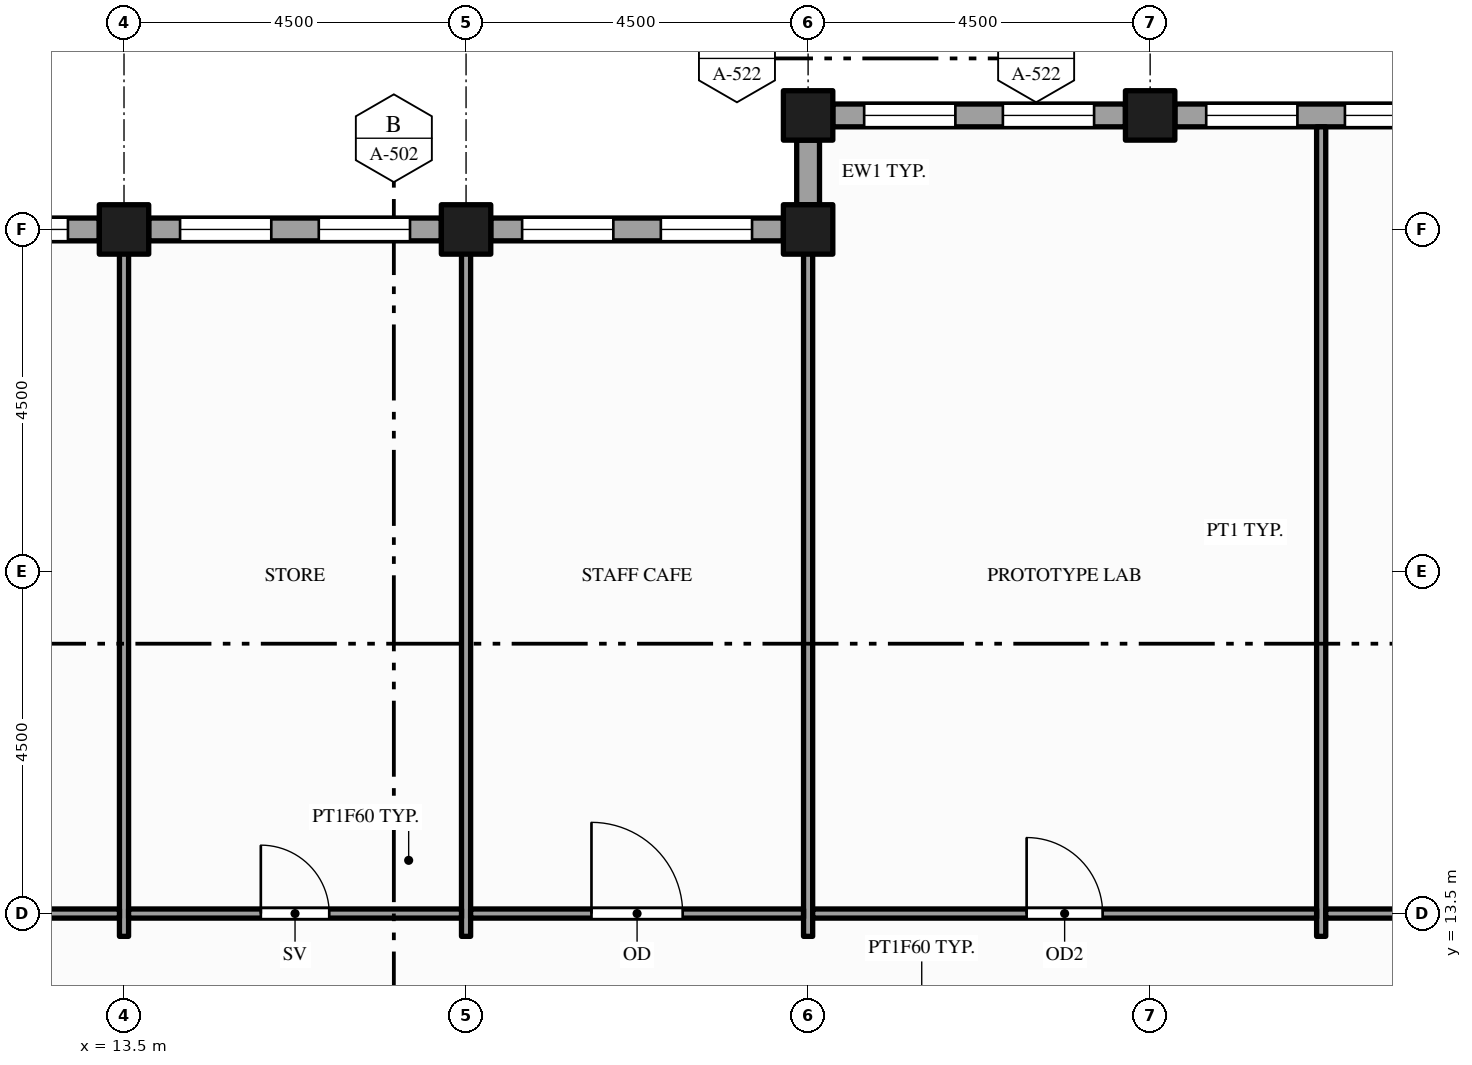
"""IFC4 building model, lengths in metres.
Left out: names, types, materials, properties, quantities, classifications, styles, units other than length and angle.
Written with IfcOpenShell. Run it as: python <this file> out.ifc"""

import sys

from ifc_helpers import new_model, si_unit, direction, frame, frame_2d, origin, origin_2d, place, context, subcontext, project, spatial, rectangle, hollow_rectangle, extrude, element, fill, save


model = new_model("IFC4")
c1 = context("Model", 3, precision=1e-05, world=origin(), true_north=direction((0.0, 1.0)))
c2 = subcontext(c1, "Body", "Model", "MODEL_VIEW")
j1 = project(units=[si_unit("LENGTHUNIT", "METRE"), si_unit("PLANEANGLEUNIT", "RADIAN")], contexts=[c1])
p1 = place(None, origin())
s1 = spatial("IfcSite", under=j1, at=p1, CompositionType="ELEMENT")
p2 = place(p1, origin())
s2 = spatial("IfcBuilding", under=s1, at=p2, CompositionType="ELEMENT")
p3 = place(p2, frame((0.0, 0.0, 261.0)))
s3 = spatial("IfcBuildingStorey", under=s2, at=p3, CompositionType="ELEMENT", Elevation=261.0)
for number, where, z_axis, x_axis in (
    (1, (13.5, 22.5, -0.15), (0.0, 0.0, 1.0), (1.0, 0.0, 0.0)),
    (2, (18.0, 22.5, -0.15), (0.0, 0.0, 1.0), (1.0, 0.0, 0.0)),
    (3, (22.5, 22.5, -0.15), (0.0, 0.0, 1.0), (1.0, 0.0, 0.0)),
    (4, (22.5, 24.0, -0.15), (0.0, 0.0, 1.0), (1.0, 0.0, 0.0)),
    (5, (27.0, 24.0, -0.15), (0.0, 0.0, 1.0), (1.0, 0.0, 0.0)),
):
    element("IfcColumn", number, at=place(p3, frame(where, z_axis=z_axis, x_axis=x_axis)), inside=s3, PredefinedType="COLUMN", context=c2, shape_type="SweptSolid", body=[
        extrude(hollow_rectangle(XDim=0.65, YDim=0.65, WallThickness=0.032, at=origin_2d()), origin(), (0.0, 0.0, 1.0), 4.0),
    ])
p4 = place(p3, frame((31.175, 24.0, 0.0), z_axis=(0.0, 0.0, 1.0), x_axis=(-1.0, 0.0, 0.0)))
e6 = element("IfcWall", 6, at=p4, inside=s3, PredefinedType="STANDARD", context=c2, shape_type="SweptSolid", body=[
    extrude(rectangle(XDim=3.85, YDim=0.3, at=frame_2d((1.925, 0.0))), origin(), (0.0, 0.0, 1.0), 2.87),
])
p5 = place(p4, frame((0.413, 0.0, 0.9)))
e7 = element("IfcOpeningElement", 7, at=p5, cuts=e6, PredefinedType="OPENING", context=c2, shape_type="SweptSolid", body=[
    extrude(rectangle(XDim=1.2, YDim=1.75, at=frame_2d((0.6, 0.875))), frame((0.0, 0.16, 0.0), z_axis=(0.0, -1.0, 0.0), x_axis=(1.0, 0.0, 0.0)), (0.0, 0.0, 1.0), 0.32),
])
p6 = place(p4, frame((2.238, 0.0, 0.9)))
e8 = element("IfcOpeningElement", 8, at=p6, cuts=e6, PredefinedType="OPENING", context=c2, shape_type="SweptSolid", body=[
    extrude(rectangle(XDim=1.2, YDim=1.75, at=frame_2d((0.6, 0.875))), frame((0.0, 0.16, 0.0), z_axis=(0.0, -1.0, 0.0), x_axis=(1.0, 0.0, 0.0)), (0.0, 0.0, 1.0), 0.32),
])
p7 = place(p3, frame((26.675, 24.0, 0.0), z_axis=(0.0, 0.0, 1.0), x_axis=(-1.0, 0.0, 0.0)))
e9 = element("IfcWall", 9, at=p7, inside=s3, PredefinedType="STANDARD", context=c2, shape_type="SweptSolid", body=[
    extrude(rectangle(XDim=3.85, YDim=0.3, at=frame_2d((1.925, 0.0))), origin(), (0.0, 0.0, 1.0), 2.87),
])
p8 = place(p7, frame((0.413, 0.0, 0.9)))
e10 = element("IfcOpeningElement", 10, at=p8, cuts=e9, PredefinedType="OPENING", context=c2, shape_type="SweptSolid", body=[
    extrude(rectangle(XDim=1.2, YDim=1.75, at=frame_2d((0.6, 0.875))), frame((0.0, 0.16, 0.0), z_axis=(0.0, -1.0, 0.0), x_axis=(1.0, 0.0, 0.0)), (0.0, 0.0, 1.0), 0.32),
])
p9 = place(p7, frame((2.238, 0.0, 0.9)))
e11 = element("IfcOpeningElement", 11, at=p9, cuts=e9, PredefinedType="OPENING", context=c2, shape_type="SweptSolid", body=[
    extrude(rectangle(XDim=1.2, YDim=1.75, at=frame_2d((0.6, 0.875))), frame((0.0, 0.16, 0.0), z_axis=(0.0, -1.0, 0.0), x_axis=(1.0, 0.0, 0.0)), (0.0, 0.0, 1.0), 0.32),
])
p10 = place(p3, frame((22.5, 23.675, 0.0), z_axis=(0.0, 0.0, 1.0), x_axis=(0.0, -1.0, 0.0)))
e12 = element("IfcWall", 12, at=p10, inside=s3, PredefinedType="STANDARD", context=c2, shape_type="SweptSolid", body=[
    extrude(rectangle(XDim=0.85, YDim=0.3, at=frame_2d((0.425, 0.0))), origin(), (0.0, 0.0, 1.0), 3.162),
])
p11 = place(p3, frame((22.175, 22.5, 0.0), z_axis=(0.0, 0.0, 1.0), x_axis=(-1.0, 0.0, 0.0)))
e13 = element("IfcWall", 13, at=p11, inside=s3, PredefinedType="STANDARD", context=c2, shape_type="SweptSolid", body=[
    extrude(rectangle(XDim=3.85, YDim=0.3, at=frame_2d((1.925, 0.0))), origin(), (0.0, 0.0, 1.0), 2.87),
])
p12 = place(p11, frame((0.413, 0.0, 0.9)))
e14 = element("IfcOpeningElement", 14, at=p12, cuts=e13, PredefinedType="OPENING", context=c2, shape_type="SweptSolid", body=[
    extrude(rectangle(XDim=1.2, YDim=1.75, at=frame_2d((0.6, 0.875))), frame((0.0, 0.16, 0.0), z_axis=(0.0, -1.0, 0.0), x_axis=(1.0, 0.0, 0.0)), (0.0, 0.0, 1.0), 0.32),
])
p13 = place(p11, frame((2.238, 0.0, 0.9)))
e15 = element("IfcOpeningElement", 15, at=p13, cuts=e13, PredefinedType="OPENING", context=c2, shape_type="SweptSolid", body=[
    extrude(rectangle(XDim=1.2, YDim=1.75, at=frame_2d((0.6, 0.875))), frame((0.0, 0.16, 0.0), z_axis=(0.0, -1.0, 0.0), x_axis=(1.0, 0.0, 0.0)), (0.0, 0.0, 1.0), 0.32),
])
p14 = place(p3, frame((17.675, 22.5, 0.0), z_axis=(0.0, 0.0, 1.0), x_axis=(-1.0, 0.0, 0.0)))
e16 = element("IfcWall", 16, at=p14, inside=s3, PredefinedType="STANDARD", context=c2, shape_type="SweptSolid", body=[
    extrude(rectangle(XDim=3.85, YDim=0.3, at=frame_2d((1.925, 0.0))), origin(), (0.0, 0.0, 1.0), 2.87),
])
p15 = place(p14, frame((0.413, 0.0, 0.9)))
e17 = element("IfcOpeningElement", 17, at=p15, cuts=e16, PredefinedType="OPENING", context=c2, shape_type="SweptSolid", body=[
    extrude(rectangle(XDim=1.2, YDim=1.75, at=frame_2d((0.6, 0.875))), frame((0.0, 0.16, 0.0), z_axis=(0.0, -1.0, 0.0), x_axis=(1.0, 0.0, 0.0)), (0.0, 0.0, 1.0), 0.32),
])
p16 = place(p14, frame((2.238, 0.0, 0.9)))
e18 = element("IfcOpeningElement", 18, at=p16, cuts=e16, PredefinedType="OPENING", context=c2, shape_type="SweptSolid", body=[
    extrude(rectangle(XDim=1.2, YDim=1.75, at=frame_2d((0.6, 0.875))), frame((0.0, 0.16, 0.0), z_axis=(0.0, -1.0, 0.0), x_axis=(1.0, 0.0, 0.0)), (0.0, 0.0, 1.0), 0.32),
])
p17 = place(p3, frame((13.175, 22.5, 0.0), z_axis=(0.0, 0.0, 1.0), x_axis=(-1.0, 0.0, 0.0)))
e19 = element("IfcWall", 19, at=p17, inside=s3, PredefinedType="STANDARD", context=c2, shape_type="SweptSolid", body=[
    extrude(rectangle(XDim=3.85, YDim=0.3, at=frame_2d((1.925, 0.0))), origin(), (0.0, 0.0, 1.0), 2.87),
])
p18 = place(p17, frame((0.413, 0.0, 0.9)))
e20 = element("IfcOpeningElement", 20, at=p18, cuts=e19, PredefinedType="OPENING", context=c2, shape_type="SweptSolid", body=[
    extrude(rectangle(XDim=1.2, YDim=1.75, at=frame_2d((0.6, 0.875))), frame((0.0, 0.16, 0.0), z_axis=(0.0, -1.0, 0.0), x_axis=(1.0, 0.0, 0.0)), (0.0, 0.0, 1.0), 0.32),
])
p19 = place(p17, frame((2.238, 0.0, 0.9)))
e21 = element("IfcOpeningElement", 21, at=p19, cuts=e19, PredefinedType="OPENING", context=c2, shape_type="SweptSolid", body=[
    extrude(rectangle(XDim=1.2, YDim=1.75, at=frame_2d((0.6, 0.875))), frame((0.0, 0.16, 0.0), z_axis=(0.0, -1.0, 0.0), x_axis=(1.0, 0.0, 0.0)), (0.0, 0.0, 1.0), 0.32),
])
for number, where, z_axis, x_axis in (
    (22, (13.5, 13.2, 0.0), (0.0, 0.0, 1.0), (0.0, 1.0, 0.0)),
    (23, (18.0, 13.2, 0.0), (0.0, 0.0, 1.0), (0.0, 1.0, 0.0)),
    (24, (22.5, 13.2, 0.0), (0.0, 0.0, 1.0), (0.0, 1.0, 0.0)),
):
    element("IfcWall", number, at=place(p3, frame(where, z_axis=z_axis, x_axis=x_axis)), inside=s3, PredefinedType="PARTITIONING", context=c2, shape_type="SweptSolid", body=[
        extrude(rectangle(XDim=9.15, YDim=0.12, at=frame_2d((4.575, 0.0))), origin(), (0.0, 0.0, 1.0), 2.87),
    ])
p20 = place(p3, frame((29.25, 13.2, 0.0), z_axis=(0.0, 0.0, 1.0), x_axis=(0.0, 1.0, 0.0)))
e25 = element("IfcWall", 25, at=p20, inside=s3, PredefinedType="PARTITIONING", context=c2, shape_type="SweptSolid", body=[
    extrude(rectangle(XDim=10.65, YDim=0.12, at=frame_2d((5.325, 0.0))), origin(), (0.0, 0.0, 1.0), 2.87),
])
p21 = place(p3, frame((0.15, 13.5, 0.0), z_axis=(0.0, 0.0, 1.0), x_axis=(1.0, 0.0, 0.0)))
e26 = element("IfcWall", 26, at=p21, inside=s3, PredefinedType="PARTITIONING", context=c2, shape_type="SweptSolid", body=[
    extrude(rectangle(XDim=13.29, YDim=0.12, at=frame_2d((6.645, 0.0))), origin(), (0.0, 0.0, 1.0), 2.87),
])
p22 = place(p21, frame((5.755, 0.0, 0.0)))
e27 = element("IfcOpeningElement", 27, at=p22, cuts=e26, PredefinedType="OPENING", context=c2, shape_type="SweptSolid", body=[
    extrude(rectangle(XDim=1.8, YDim=2.1, at=frame_2d((0.9, 1.05))), frame((0.0, 0.07, 0.0), z_axis=(0.0, -1.0, 0.0), x_axis=(1.0, 0.0, 0.0)), (0.0, 0.0, 1.0), 0.14),
])
p23 = place(p3, frame((13.56, 13.5, 0.0), z_axis=(0.0, 0.0, 1.0), x_axis=(1.0, 0.0, 0.0)))
e28 = element("IfcWall", 28, at=p23, inside=s3, PredefinedType="PARTITIONING", context=c2, shape_type="SweptSolid", body=[
    extrude(rectangle(XDim=4.38, YDim=0.12, at=frame_2d((2.19, 0.0))), origin(), (0.0, 0.0, 1.0), 2.87),
])
p24 = place(p23, frame((1.74, 0.0, 0.0)))
e29 = element("IfcOpeningElement", 29, at=p24, cuts=e28, PredefinedType="OPENING", context=c2, shape_type="SweptSolid", body=[
    extrude(rectangle(XDim=0.9, YDim=2.1, at=frame_2d((0.45, 1.05))), frame((0.0, 0.07, 0.0), z_axis=(0.0, -1.0, 0.0), x_axis=(1.0, 0.0, 0.0)), (0.0, 0.0, 1.0), 0.14),
])
p25 = place(p3, frame((18.06, 13.5, 0.0), z_axis=(0.0, 0.0, 1.0), x_axis=(1.0, 0.0, 0.0)))
e30 = element("IfcWall", 30, at=p25, inside=s3, PredefinedType="PARTITIONING", context=c2, shape_type="SweptSolid", body=[
    extrude(rectangle(XDim=4.38, YDim=0.12, at=frame_2d((2.19, 0.0))), origin(), (0.0, 0.0, 1.0), 2.87),
])
p26 = place(p25, frame((1.59, 0.0, 0.0)))
e31 = element("IfcOpeningElement", 31, at=p26, cuts=e30, PredefinedType="OPENING", context=c2, shape_type="SweptSolid", body=[
    extrude(rectangle(XDim=1.2, YDim=2.1, at=frame_2d((0.6, 1.05))), frame((0.0, 0.07, 0.0), z_axis=(0.0, -1.0, 0.0), x_axis=(1.0, 0.0, 0.0)), (0.0, 0.0, 1.0), 0.14),
])
p27 = place(p3, frame((22.56, 13.5, 0.0), z_axis=(0.0, 0.0, 1.0), x_axis=(1.0, 0.0, 0.0)))
e32 = element("IfcWall", 32, at=p27, inside=s3, PredefinedType="PARTITIONING", context=c2, shape_type="SweptSolid", body=[
    extrude(rectangle(XDim=6.63, YDim=0.12, at=frame_2d((3.315, 0.0))), origin(), (0.0, 0.0, 1.0), 2.87),
])
p28 = place(p27, frame((2.815, 0.0, 0.0)))
e33 = element("IfcOpeningElement", 33, at=p28, cuts=e32, PredefinedType="OPENING", context=c2, shape_type="SweptSolid", body=[
    extrude(rectangle(XDim=1.0, YDim=2.1, at=frame_2d((0.5, 1.05))), frame((0.0, 0.07, 0.0), z_axis=(0.0, -1.0, 0.0), x_axis=(1.0, 0.0, 0.0)), (0.0, 0.0, 1.0), 0.14),
])
p29 = place(p3, frame((29.31, 13.5, 0.0), z_axis=(0.0, 0.0, 1.0), x_axis=(1.0, 0.0, 0.0)))
e34 = element("IfcWall", 34, at=p29, inside=s3, PredefinedType="PARTITIONING", context=c2, shape_type="SweptSolid", body=[
    extrude(rectangle(XDim=13.38, YDim=0.12, at=frame_2d((6.69, 0.0))), origin(), (0.0, 0.0, 1.0), 2.87),
])
p30 = place(p29, frame((6.19, 0.0, 0.0)))
e35 = element("IfcOpeningElement", 35, at=p30, cuts=e34, PredefinedType="OPENING", context=c2, shape_type="SweptSolid", body=[
    extrude(rectangle(XDim=1.0, YDim=2.1, at=frame_2d((0.5, 1.05))), frame((0.0, 0.07, 0.0), z_axis=(0.0, -1.0, 0.0), x_axis=(1.0, 0.0, 0.0)), (0.0, 0.0, 1.0), 0.14),
])
p31 = place(p5, origin())
e36 = element("IfcWindow", 36, at=p31, inside=s3, PartitioningType="SINGLE_PANEL", PredefinedType="WINDOW", context=c2, shape_type="SweptSolid", body=[
    extrude(rectangle(XDim=1.2, YDim=1.75, at=frame_2d((0.6, 0.875))), frame((0.0, 0.03, 0.0), z_axis=(0.0, -1.0, 0.0), x_axis=(1.0, 0.0, 0.0)), (0.0, 0.0, 1.0), 0.06),
])
fill(e7, e36)
p32 = place(p6, origin())
e37 = element("IfcWindow", 37, at=p32, inside=s3, PartitioningType="SINGLE_PANEL", PredefinedType="WINDOW", context=c2, shape_type="SweptSolid", body=[
    extrude(rectangle(XDim=1.2, YDim=1.75, at=frame_2d((0.6, 0.875))), frame((0.0, 0.03, 0.0), z_axis=(0.0, -1.0, 0.0), x_axis=(1.0, 0.0, 0.0)), (0.0, 0.0, 1.0), 0.06),
])
fill(e8, e37)
p33 = place(p8, origin())
e38 = element("IfcWindow", 38, at=p33, inside=s3, PartitioningType="SINGLE_PANEL", PredefinedType="WINDOW", context=c2, shape_type="SweptSolid", body=[
    extrude(rectangle(XDim=1.2, YDim=1.75, at=frame_2d((0.6, 0.875))), frame((0.0, 0.03, 0.0), z_axis=(0.0, -1.0, 0.0), x_axis=(1.0, 0.0, 0.0)), (0.0, 0.0, 1.0), 0.06),
])
fill(e10, e38)
p34 = place(p9, origin())
e39 = element("IfcWindow", 39, at=p34, inside=s3, PartitioningType="SINGLE_PANEL", PredefinedType="WINDOW", context=c2, shape_type="SweptSolid", body=[
    extrude(rectangle(XDim=1.2, YDim=1.75, at=frame_2d((0.6, 0.875))), frame((0.0, 0.03, 0.0), z_axis=(0.0, -1.0, 0.0), x_axis=(1.0, 0.0, 0.0)), (0.0, 0.0, 1.0), 0.06),
])
fill(e11, e39)
p35 = place(p12, origin())
e40 = element("IfcWindow", 40, at=p35, inside=s3, PartitioningType="SINGLE_PANEL", PredefinedType="WINDOW", context=c2, shape_type="SweptSolid", body=[
    extrude(rectangle(XDim=1.2, YDim=1.75, at=frame_2d((0.6, 0.875))), frame((0.0, 0.03, 0.0), z_axis=(0.0, -1.0, 0.0), x_axis=(1.0, 0.0, 0.0)), (0.0, 0.0, 1.0), 0.06),
])
fill(e14, e40)
p36 = place(p13, origin())
e41 = element("IfcWindow", 41, at=p36, inside=s3, PartitioningType="SINGLE_PANEL", PredefinedType="WINDOW", context=c2, shape_type="SweptSolid", body=[
    extrude(rectangle(XDim=1.2, YDim=1.75, at=frame_2d((0.6, 0.875))), frame((0.0, 0.03, 0.0), z_axis=(0.0, -1.0, 0.0), x_axis=(1.0, 0.0, 0.0)), (0.0, 0.0, 1.0), 0.06),
])
fill(e15, e41)
p37 = place(p15, origin())
e42 = element("IfcWindow", 42, at=p37, inside=s3, PartitioningType="SINGLE_PANEL", PredefinedType="WINDOW", context=c2, shape_type="SweptSolid", body=[
    extrude(rectangle(XDim=1.2, YDim=1.75, at=frame_2d((0.6, 0.875))), frame((0.0, 0.03, 0.0), z_axis=(0.0, -1.0, 0.0), x_axis=(1.0, 0.0, 0.0)), (0.0, 0.0, 1.0), 0.06),
])
fill(e17, e42)
p38 = place(p16, origin())
e43 = element("IfcWindow", 43, at=p38, inside=s3, PartitioningType="SINGLE_PANEL", PredefinedType="WINDOW", context=c2, shape_type="SweptSolid", body=[
    extrude(rectangle(XDim=1.2, YDim=1.75, at=frame_2d((0.6, 0.875))), frame((0.0, 0.03, 0.0), z_axis=(0.0, -1.0, 0.0), x_axis=(1.0, 0.0, 0.0)), (0.0, 0.0, 1.0), 0.06),
])
fill(e18, e43)
p39 = place(p18, origin())
e44 = element("IfcWindow", 44, at=p39, inside=s3, PartitioningType="SINGLE_PANEL", PredefinedType="WINDOW", context=c2, shape_type="SweptSolid", body=[
    extrude(rectangle(XDim=1.2, YDim=1.75, at=frame_2d((0.6, 0.875))), frame((0.0, 0.03, 0.0), z_axis=(0.0, -1.0, 0.0), x_axis=(1.0, 0.0, 0.0)), (0.0, 0.0, 1.0), 0.06),
])
fill(e20, e44)
p40 = place(p24, origin())
e45 = element("IfcDoor", 45, at=p40, inside=s3, OperationType="SINGLE_SWING_LEFT", PredefinedType="DOOR", context=c2, shape_type="SweptSolid", body=[
    extrude(rectangle(XDim=0.9, YDim=2.1, at=frame_2d((0.45, 1.05))), frame((0.0, 0.025, 0.0), z_axis=(0.0, -1.0, 0.0), x_axis=(1.0, 0.0, 0.0)), (0.0, 0.0, 1.0), 0.05),
])
fill(e29, e45)
p41 = place(p26, origin())
e46 = element("IfcDoor", 46, at=p41, inside=s3, OperationType="SINGLE_SWING_LEFT", PredefinedType="DOOR", context=c2, shape_type="SweptSolid", body=[
    extrude(rectangle(XDim=1.2, YDim=2.1, at=frame_2d((0.6, 1.05))), frame((0.0, 0.025, 0.0), z_axis=(0.0, -1.0, 0.0), x_axis=(1.0, 0.0, 0.0)), (0.0, 0.0, 1.0), 0.05),
])
fill(e31, e46)
p42 = place(p28, origin())
e47 = element("IfcDoor", 47, at=p42, inside=s3, OperationType="SINGLE_SWING_LEFT", PredefinedType="DOOR", context=c2, shape_type="SweptSolid", body=[
    extrude(rectangle(XDim=1.0, YDim=2.1, at=frame_2d((0.5, 1.05))), frame((0.0, 0.025, 0.0), z_axis=(0.0, -1.0, 0.0), x_axis=(1.0, 0.0, 0.0)), (0.0, 0.0, 1.0), 0.05),
])
fill(e33, e47)
save(model, sys.argv[1])
